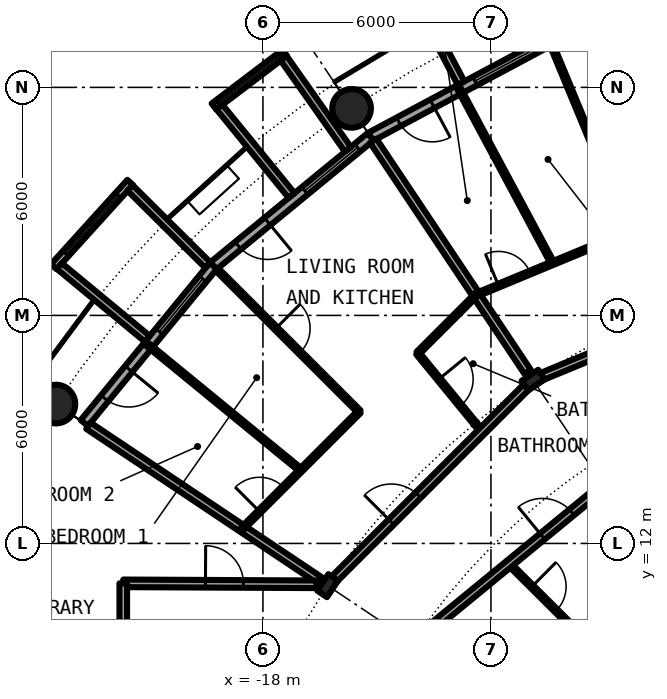
"""IFC4 building model, lengths in metres.
Left out: names, types, materials, properties, quantities, classifications, styles, units other than length and angle.
Written with IfcOpenShell. Run it as: python <this file> out.ifc"""

import sys

from ifc_helpers import new_model, si_unit, direction, frame, frame_2d, origin, origin_2d, place, context, subcontext, project, spatial, rectangle, circle, hollow_circle, i_section, extrude, element, fill, save


model = new_model("IFC4")
c1 = context("Model", 3, precision=1e-05, world=origin(), true_north=direction((0.0, 1.0)))
c2 = subcontext(c1, "Body", "Model", "MODEL_VIEW")
j1 = project(units=[si_unit("LENGTHUNIT", "METRE"), si_unit("PLANEANGLEUNIT", "RADIAN")], contexts=[c1])
p1 = place(None, origin())
s1 = spatial("IfcSite", under=j1, at=p1, CompositionType="ELEMENT")
p2 = place(p1, origin())
s2 = spatial("IfcBuilding", under=s1, at=p2, CompositionType="ELEMENT")
p3 = place(p2, frame((0.0, 0.0, 72.75)))
s3 = spatial("IfcBuildingStorey", under=s2, at=p3, CompositionType="ELEMENT", Elevation=72.75)
for number, where, z_axis, x_axis in (
    (1, (-15.667, 23.448, 0.0), (0.0, 0.0, 1.0), (1.0, 0.0, 0.0)),
    (2, (-23.448, 15.667, 0.0), (0.0, 0.0, 1.0), (1.0, 0.0, 0.0)),
):
    element("IfcColumn", number, at=place(p3, frame(where, z_axis=z_axis, x_axis=x_axis)), inside=s3, PredefinedType="COLUMN", context=c2, shape_type="SweptSolid", body=[
        extrude(hollow_circle(Radius=0.508, WallThickness=0.04, at=origin_2d()), origin(), (0.0, 0.0, 1.0), 3.05),
    ])
for number, where, z_axis, x_axis in (
    (3, (-10.889, 16.297, 0.0), (0.0, 0.0, 1.0), (-0.556, 0.831, 0.0)),
    (4, (-16.297, 10.889, 0.0), (0.0, 0.0, 1.0), (-0.831, 0.556, 0.0)),
):
    element("IfcColumn", number, at=place(p3, frame(where, z_axis=z_axis, x_axis=x_axis)), inside=s3, PredefinedType="COLUMN", context=c2, shape_type="SweptSolid", body=[
        extrude(i_section(OverallWidth=0.306, OverallDepth=0.524, WebThickness=0.021, FlangeThickness=0.04, FilletRadius=0.027, at=origin_2d()), origin(), (0.0, 0.0, 1.0), 3.05),
    ])
p4 = place(p3, frame((-10.447, 25.222, 0.0), z_axis=(0.0, 0.0, 1.0), x_axis=(-0.881915646801, -0.471407246368, 0.0)))
e5 = element("IfcWall", 5, at=p4, inside=s3, PredefinedType="SOLIDWALL", context=c2, shape_type="SweptSolid", body=[
    extrude(rectangle(XDim=5.352, YDim=0.25, at=frame_2d((2.676, 0.0))), origin(), (0.0, 0.0, 1.0), 2.7),
])
p5 = place(p4, frame((0.441, 0.0, 0.3)))
e6 = element("IfcOpeningElement", 6, at=p5, cuts=e5, PredefinedType="OPENING", context=c2, shape_type="SweptSolid", body=[
    extrude(rectangle(XDim=1.8, YDim=2.1, at=frame_2d((0.9, 1.05))), frame((0.0, 0.135, 0.0), z_axis=(0.0, -1.0, 0.0), x_axis=(1.0, 0.0, 0.0)), (0.0, 0.0, 1.0), 0.27),
])
p6 = place(p4, frame((3.51, 0.0, 0.0)))
e7 = element("IfcOpeningElement", 7, at=p6, cuts=e5, PredefinedType="OPENING", context=c2, shape_type="SweptSolid", body=[
    extrude(rectangle(XDim=1.0, YDim=2.2, at=frame_2d((0.5, 1.1))), frame((0.0, 0.135, 0.0), z_axis=(0.0, -1.0, 0.0), x_axis=(1.0, 0.0, 0.0)), (0.0, 0.0, 1.0), 0.27),
])
p7 = place(p3, frame((-12.787, 24.113, -0.03), z_axis=(0.0, 0.0, 1.0), x_axis=(-0.468365282436, 0.883534924159, 0.0)))
e8 = element("IfcWall", 8, at=p7, inside=s3, PredefinedType="SOLIDWALL", context=c2, shape_type="SweptSolid", body=[
    extrude(rectangle(XDim=3.006, YDim=0.2, at=frame_2d((1.503, 0.0))), origin(), (0.0, 0.0, 1.0), 2.73),
])
p8 = place(p3, frame((-15.167, 22.699, 0.0), z_axis=(0.0, 0.0, 1.0), x_axis=(-0.773019449054, -0.634382322723, 0.0)))
e9 = element("IfcWall", 9, at=p8, inside=s3, PredefinedType="SOLIDWALL", context=c2, shape_type="SweptSolid", body=[
    extrude(rectangle(XDim=5.352, YDim=0.25, at=frame_2d((2.676, 0.0))), origin(), (0.0, 0.0, 1.0), 2.7),
])
p9 = place(p8, frame((0.441, 0.0, 0.3)))
e10 = element("IfcOpeningElement", 10, at=p9, cuts=e9, PredefinedType="OPENING", context=c2, shape_type="SweptSolid", body=[
    extrude(rectangle(XDim=1.8, YDim=2.1, at=frame_2d((0.9, 1.05))), frame((0.0, 0.135, 0.0), z_axis=(0.0, -1.0, 0.0), x_axis=(1.0, 0.0, 0.0)), (0.0, 0.0, 1.0), 0.27),
])
p10 = place(p8, frame((3.51, 0.0, 0.0)))
e11 = element("IfcOpeningElement", 11, at=p10, cuts=e9, PredefinedType="OPENING", context=c2, shape_type="SweptSolid", body=[
    extrude(rectangle(XDim=1.0, YDim=2.2, at=frame_2d((0.5, 1.1))), frame((0.0, 0.135, 0.0), z_axis=(0.0, -1.0, 0.0), x_axis=(1.0, 0.0, 0.0)), (0.0, 0.0, 1.0), 0.27),
])
p11 = place(p3, frame((-17.427, 24.909, -0.03), z_axis=(0.0, 0.0, 1.0), x_axis=(-0.796842165306, -0.60418752353, 0.0)))
e12 = element("IfcWall", 12, at=p11, inside=s3, PredefinedType="SOLIDWALL", context=c2, shape_type="SweptSolid", body=[
    extrude(rectangle(XDim=2.337, YDim=0.2, at=frame_2d((1.168, 0.0))), origin(), (0.0, 0.0, 1.0), 2.73),
])
p12 = place(p11, frame((0.128, 0.0, 0.33)))
e13 = element("IfcOpeningElement", 13, at=p12, cuts=e12, PredefinedType="OPENING", context=c2, shape_type="SweptSolid", body=[
    extrude(circle(Radius=1.04, at=frame_2d((1.04, 1.04))), frame((0.0, 0.11, 0.0), z_axis=(0.0, -1.0, 0.0), x_axis=(1.0, 0.0, 0.0)), (0.0, 0.0, 1.0), 0.22),
])
p13 = place(p3, frame((-15.765, 22.37, -0.03), z_axis=(0.0, 0.0, 1.0), x_axis=(-0.576274612209, 0.817256123454, 0.0)))
e14 = element("IfcWall", 14, at=p13, inside=s3, PredefinedType="SOLIDWALL", context=c2, shape_type="SweptSolid", body=[
    extrude(rectangle(XDim=2.933, YDim=0.2, at=frame_2d((1.466, 0.0))), origin(), (0.0, 0.0, 1.0), 2.73),
])
p14 = place(p3, frame((-17.246, 21.155, -0.03), z_axis=(0.0, 0.0, 1.0), x_axis=(-0.631741648902, 0.775179004516, 0.0)))
e15 = element("IfcWall", 15, at=p14, inside=s3, PredefinedType="SOLIDWALL", context=c2, shape_type="SweptSolid", body=[
    extrude(rectangle(XDim=3.006, YDim=0.2, at=frame_2d((1.503, 0.0))), origin(), (0.0, 0.0, 1.0), 2.73),
])
p15 = place(p3, frame((-19.304, 19.304, 0.0), z_axis=(0.0, 0.0, 1.0), x_axis=(-0.634382322723, -0.773019449054, 0.0)))
e16 = element("IfcWall", 16, at=p15, inside=s3, PredefinedType="SOLIDWALL", context=c2, shape_type="SweptSolid", body=[
    extrude(rectangle(XDim=5.352, YDim=0.25, at=frame_2d((2.676, 0.0))), origin(), (0.0, 0.0, 1.0), 2.7),
])
p16 = place(p15, frame((0.441, 0.0, 0.3)))
e17 = element("IfcOpeningElement", 17, at=p16, cuts=e16, PredefinedType="OPENING", context=c2, shape_type="SweptSolid", body=[
    extrude(rectangle(XDim=1.8, YDim=2.1, at=frame_2d((0.9, 1.05))), frame((0.0, 0.135, 0.0), z_axis=(0.0, -1.0, 0.0), x_axis=(1.0, 0.0, 0.0)), (0.0, 0.0, 1.0), 0.27),
])
p17 = place(p15, frame((3.51, 0.0, 0.0)))
e18 = element("IfcOpeningElement", 18, at=p17, cuts=e16, PredefinedType="OPENING", context=c2, shape_type="SweptSolid", body=[
    extrude(rectangle(XDim=1.0, YDim=2.2, at=frame_2d((0.5, 1.1))), frame((0.0, 0.135, 0.0), z_axis=(0.0, -1.0, 0.0), x_axis=(1.0, 0.0, 0.0)), (0.0, 0.0, 1.0), 0.27),
])
p18 = place(p3, frame((-21.493, 21.5, -0.03), z_axis=(0.0, 0.0, 1.0), x_axis=(-0.671506829416, -0.740998365753, 0.0)))
e19 = element("IfcWall", 19, at=p18, inside=s3, PredefinedType="SOLIDWALL", context=c2, shape_type="SweptSolid", body=[
    extrude(rectangle(XDim=2.993, YDim=0.2, at=frame_2d((1.497, 0.0))), origin(), (0.0, 0.0, 1.0), 2.73),
])
p19 = place(p18, frame((0.457, 0.0, 0.33)))
e20 = element("IfcOpeningElement", 20, at=p19, cuts=e19, PredefinedType="OPENING", context=c2, shape_type="SweptSolid", body=[
    extrude(circle(Radius=1.04, at=frame_2d((1.04, 1.04))), frame((0.0, 0.11, 0.0), z_axis=(0.0, -1.0, 0.0), x_axis=(1.0, 0.0, 0.0)), (0.0, 0.0, 1.0), 0.22),
])
p20 = place(p3, frame((-19.45, 19.323, -0.03), z_axis=(0.0, 0.0, 1.0), x_axis=(-0.709727076896, 0.704476739375, 0.0)))
e21 = element("IfcWall", 21, at=p20, inside=s3, PredefinedType="SOLIDWALL", context=c2, shape_type="SweptSolid", body=[
    extrude(rectangle(XDim=2.883, YDim=0.2, at=frame_2d((1.441, 0.0))), origin(), (0.0, 0.0, 1.0), 2.73),
])
p21 = place(p3, frame((-21.041, 17.384, -0.03), z_axis=(0.0, 0.0, 1.0), x_axis=(-0.770784861449, 0.63709551667, 0.0)))
e22 = element("IfcWall", 22, at=p21, inside=s3, PredefinedType="SOLIDWALL", context=c2, shape_type="SweptSolid", body=[
    extrude(rectangle(XDim=3.006, YDim=0.2, at=frame_2d((1.503, 0.0))), origin(), (0.0, 0.0, 1.0), 2.73),
])
p22 = place(p3, frame((-22.595, 15.098, 0.0), z_axis=(0.0, 0.0, 1.0), x_axis=(0.831382022135, -0.555701298605, 0.0)))
e23 = element("IfcWall", 23, at=p22, inside=s3, PredefinedType="PARTITIONING", context=c2, shape_type="SweptSolid", body=[
    extrude(rectangle(XDim=7.313, YDim=0.2, at=frame_2d((3.657, 0.0))), origin(), (0.0, 0.0, 1.0), 2.7),
])
p23 = place(p3, frame((-21.023, 17.22, 0.0), z_axis=(0.0, 0.0, 1.0), x_axis=(0.773517471898, -0.633774976367, 0.0)))
e24 = element("IfcWall", 24, at=p23, inside=s3, PredefinedType="PARTITIONING", context=c2, shape_type="SweptSolid", body=[
    extrude(rectangle(XDim=5.196, YDim=0.1, at=frame_2d((2.598, 0.0))), origin(), (0.0, 0.0, 1.0), 2.7),
])
p24 = place(p3, frame((-19.216, 19.216, 0.0), z_axis=(0.0, 0.0, 1.0), x_axis=(0.707106781187, -0.707106781187, 0.0)))
e25 = element("IfcWall", 25, at=p24, inside=s3, PredefinedType="PARTITIONING", context=c2, shape_type="SweptSolid", body=[
    extrude(rectangle(XDim=5.305, YDim=0.1, at=frame_2d((2.652, 0.0))), origin(), (0.0, 0.0, 1.0), 2.7),
])
p25 = place(p24, frame((2.202, 0.0, 0.0)))
e26 = element("IfcOpeningElement", 26, at=p25, cuts=e25, PredefinedType="OPENING", context=c2, shape_type="SweptSolid", body=[
    extrude(rectangle(XDim=0.9, YDim=2.3, at=frame_2d((0.45, 1.15))), frame((0.0, 0.06, 0.0), z_axis=(0.0, -1.0, 0.0), x_axis=(1.0, 0.0, 0.0)), (0.0, 0.0, 1.0), 0.12),
])
p26 = place(p3, frame((-15.097, 22.595, 0.0), z_axis=(0.0, 0.0, 1.0), x_axis=(0.555516661303, -0.831505405283, 0.0)))
e27 = element("IfcWall", 27, at=p26, inside=s3, PredefinedType="PARTITIONING", context=c2, shape_type="SweptSolid", body=[
    extrude(rectangle(XDim=7.312, YDim=0.2, at=frame_2d((3.656, 0.0))), origin(), (0.0, 0.0, 1.0), 2.7),
])
p27 = place(p3, frame((-13.927, 17.004, 0.0), z_axis=(0.0, 0.0, 1.0), x_axis=(0.633582447834, -0.77367517848, 0.0)))
e28 = element("IfcWall", 28, at=p27, inside=s3, PredefinedType="PARTITIONING", context=c2, shape_type="SweptSolid", body=[
    extrude(rectangle(XDim=2.661, YDim=0.1, at=frame_2d((1.331, 0.0))), origin(), (0.0, 0.0, 1.0), 2.7),
])
p28 = place(p27, frame((0.881, 0.0, 0.0)))
e29 = element("IfcOpeningElement", 29, at=p28, cuts=e28, PredefinedType="OPENING", context=c2, shape_type="SweptSolid", body=[
    extrude(rectangle(XDim=0.9, YDim=2.3, at=frame_2d((0.45, 1.15))), frame((0.0, 0.06, 0.0), z_axis=(0.0, -1.0, 0.0), x_axis=(1.0, 0.0, 0.0)), (0.0, 0.0, 1.0), 0.12),
])
p29 = place(p3, frame((-12.833, 23.954, 0.0), z_axis=(0.0, 0.0, 1.0), x_axis=(0.472148388886, -0.881519085938, 0.0)))
e30 = element("IfcWall", 30, at=p29, inside=s3, PredefinedType="PARTITIONING", context=c2, shape_type="SweptSolid", body=[
    extrude(rectangle(XDim=5.196, YDim=0.1, at=frame_2d((2.598, 0.0))), origin(), (0.0, 0.0, 1.0), 2.7),
])
p30 = place(p3, frame((-11.524, 11.464, 0.0), z_axis=(0.0, 0.0, 1.0), x_axis=(0.708796844581, -0.705412668665, 0.0)))
e31 = element("IfcWall", 31, at=p30, inside=s3, PredefinedType="PARTITIONING", context=c2, shape_type="SweptSolid", body=[
    extrude(rectangle(XDim=2.597, YDim=0.1, at=frame_2d((1.299, 0.0))), origin(), (0.0, 0.0, 1.0), 2.7),
])
p31 = place(p30, frame((0.849, 0.0, 0.0)))
e32 = element("IfcOpeningElement", 32, at=p31, cuts=e31, PredefinedType="OPENING", context=c2, shape_type="SweptSolid", body=[
    extrude(rectangle(XDim=0.9, YDim=2.3, at=frame_2d((0.45, 1.15))), frame((0.0, 0.06, 0.0), z_axis=(0.0, -1.0, 0.0), x_axis=(1.0, 0.0, 0.0)), (0.0, 0.0, 1.0), 0.12),
])
p32 = place(p3, frame((-10.399, 25.106, 0.0), z_axis=(0.0, 0.0, 1.0), x_axis=(0.382620183578, -0.92390572848, 0.0)))
e33 = element("IfcWall", 33, at=p32, inside=s3, PredefinedType="PARTITIONING", context=c2, shape_type="SweptSolid", body=[
    extrude(rectangle(XDim=5.302, YDim=0.1, at=frame_2d((2.651, 0.0))), origin(), (0.0, 0.0, 1.0), 2.7),
])
p33 = place(p32, frame((2.201, 0.0, 0.0)))
e34 = element("IfcOpeningElement", 34, at=p33, cuts=e33, PredefinedType="OPENING", context=c2, shape_type="SweptSolid", body=[
    extrude(rectangle(XDim=0.9, YDim=2.3, at=frame_2d((0.45, 1.15))), frame((0.0, 0.06, 0.0), z_axis=(0.0, -1.0, 0.0), x_axis=(1.0, 0.0, 0.0)), (0.0, 0.0, 1.0), 0.12),
])
p34 = place(p3, frame((-21.675, 10.95, 0.0), z_axis=(0.0, 0.0, 1.0), x_axis=(0.999988019025, -0.004895079807, 0.0)))
e35 = element("IfcWall", 35, at=p34, inside=s3, PredefinedType="PARTITIONING", context=c2, shape_type="SweptSolid", body=[
    extrude(rectangle(XDim=5.087, YDim=0.2, at=frame_2d((2.543, 0.0))), origin(), (0.0, 0.0, 1.0), 2.7),
])
p35 = place(p34, frame((2.163, 0.0, 0.0)))
e36 = element("IfcOpeningElement", 36, at=p35, cuts=e35, PredefinedType="OPENING", context=c2, shape_type="SweptSolid", body=[
    extrude(rectangle(XDim=1.0, YDim=2.3, at=frame_2d((0.5, 1.15))), frame((0.0, 0.11, 0.0), z_axis=(0.0, -1.0, 0.0), x_axis=(1.0, 0.0, 0.0)), (0.0, 0.0, 1.0), 0.22),
])
p36 = place(p3, frame((-10.087, 9.3, 0.0), z_axis=(0.0, 0.0, 1.0), x_axis=(0.772957368531, 0.6344579627, 0.0)))
e37 = element("IfcWall", 37, at=p36, inside=s3, PredefinedType="PARTITIONING", context=c2, shape_type="SweptSolid", body=[
    extrude(rectangle(XDim=1.906, YDim=0.1, at=frame_2d((0.953, 0.0))), origin(), (0.0, 0.0, 1.0), 2.7),
])
p37 = place(p3, frame((-14.052, 9.389, 0.0), z_axis=(0.0, 0.0, 1.0), x_axis=(0.77292501819, 0.634497372931, 0.0)))
e38 = element("IfcWall", 38, at=p37, inside=s3, PredefinedType="PARTITIONING", context=c2, shape_type="SweptSolid", body=[
    extrude(rectangle(XDim=9.81, YDim=0.2, at=frame_2d((4.905, 0.0))), origin(), (0.0, 0.0, 1.0), 2.7),
])
p38 = place(p37, frame((4.406, 0.0, 0.0)))
e39 = element("IfcOpeningElement", 39, at=p38, cuts=e38, PredefinedType="OPENING", context=c2, shape_type="SweptSolid", body=[
    extrude(rectangle(XDim=1.0, YDim=2.3, at=frame_2d((0.5, 1.15))), frame((0.0, 0.11, 0.0), z_axis=(0.0, -1.0, 0.0), x_axis=(1.0, 0.0, 0.0)), (0.0, 0.0, 1.0), 0.22),
])
p39 = place(p3, frame((-16.186, 11.0, 0.0), z_axis=(0.0, 0.0, 1.0), x_axis=(0.707106781187, 0.707106781187, 0.0)))
e40 = element("IfcWall", 40, at=p39, inside=s3, PredefinedType="PARTITIONING", context=c2, shape_type="SweptSolid", body=[
    extrude(rectangle(XDim=7.334, YDim=0.2, at=frame_2d((3.667, 0.0))), origin(), (0.0, 0.0, 1.0), 2.38),
])
p40 = place(p39, frame((2.211, 0.0, 0.0)))
e41 = element("IfcOpeningElement", 41, at=p40, cuts=e40, PredefinedType="OPENING", context=c2, shape_type="SweptSolid", body=[
    extrude(rectangle(XDim=1.0, YDim=2.3, at=frame_2d((0.5, 1.15))), frame((0.0, 0.11, 0.0), z_axis=(0.0, -1.0, 0.0), x_axis=(1.0, 0.0, 0.0)), (0.0, 0.0, 1.0), 0.22),
])
p41 = place(p3, frame((-10.745, 16.357, 0.0), z_axis=(0.0, 0.0, 1.0), x_axis=(0.923928411035, 0.382565407848, 0.0)))
e42 = element("IfcWall", 42, at=p41, inside=s3, PredefinedType="PARTITIONING", context=c2, shape_type="SweptSolid", body=[
    extrude(rectangle(XDim=7.335, YDim=0.2, at=frame_2d((3.667, 0.0))), origin(), (0.0, 0.0, 1.0), 2.38),
])
p42 = place(p41, frame((2.212, 0.0, 0.0)))
e43 = element("IfcOpeningElement", 43, at=p42, cuts=e42, PredefinedType="OPENING", context=c2, shape_type="SweptSolid", body=[
    extrude(rectangle(XDim=1.0, YDim=2.3, at=frame_2d((0.5, 1.15))), frame((0.0, 0.11, 0.0), z_axis=(0.0, -1.0, 0.0), x_axis=(1.0, 0.0, 0.0)), (0.0, 0.0, 1.0), 0.22),
])
p43 = place(p3, frame((-21.675, 9.3, 0.0), z_axis=(0.0, 0.0, 1.0), x_axis=(0.0, 1.0, 0.0)))
e44 = element("IfcWall", 44, at=p43, inside=s3, PredefinedType="PARTITIONING", context=c2, shape_type="SweptSolid", body=[
    extrude(rectangle(XDim=1.65, YDim=0.2, at=frame_2d((0.825, 0.0))), origin(), (0.0, 0.0, 1.0), 2.7),
])
p44 = place(p3, frame((-18.542, 12.389, 0.0), z_axis=(0.0, 0.0, 1.0), x_axis=(0.707190945535, 0.707022606819, 0.0)))
e45 = element("IfcWall", 45, at=p44, inside=s3, PredefinedType="PARTITIONING", context=c2, shape_type="SweptSolid", body=[
    extrude(rectangle(XDim=4.351, YDim=0.1, at=frame_2d((2.175, 0.0))), origin(), (0.0, 0.0, 1.0), 2.7),
])
p45 = place(p44, frame((0.639, 0.0, 0.0)))
e46 = element("IfcOpeningElement", 46, at=p45, cuts=e45, PredefinedType="OPENING", context=c2, shape_type="SweptSolid", body=[
    extrude(rectangle(XDim=0.9, YDim=2.3, at=frame_2d((0.45, 1.15))), frame((0.0, 0.06, 0.0), z_axis=(0.0, -1.0, 0.0), x_axis=(1.0, 0.0, 0.0)), (0.0, 0.0, 1.0), 0.12),
])
p46 = place(p3, frame((-13.924, 17.006, 0.0), z_axis=(0.0, 0.0, 1.0), x_axis=(0.707387256653, 0.706826194425, 0.0)))
e47 = element("IfcWall", 47, at=p46, inside=s3, PredefinedType="PARTITIONING", context=c2, shape_type="SweptSolid", body=[
    extrude(rectangle(XDim=2.176, YDim=0.1, at=frame_2d((1.088, 0.0))), origin(), (0.0, 0.0, 1.0), 2.7),
])
p47 = place(p3, frame((-12.397, 18.536, 0.0), z_axis=(0.0, 0.0, 1.0), x_axis=(0.923761942059, 0.382967197554, 0.0)))
e48 = element("IfcWall", 48, at=p47, inside=s3, PredefinedType="PARTITIONING", context=c2, shape_type="SweptSolid", body=[
    extrude(rectangle(XDim=4.356, YDim=0.1, at=frame_2d((2.178, 0.0))), origin(), (0.0, 0.0, 1.0), 2.7),
])
p48 = place(p47, frame((0.646, 0.0, 0.0)))
e49 = element("IfcOpeningElement", 49, at=p48, cuts=e48, PredefinedType="OPENING", context=c2, shape_type="SweptSolid", body=[
    extrude(rectangle(XDim=0.9, YDim=2.3, at=frame_2d((0.45, 1.15))), frame((0.0, 0.06, 0.0), z_axis=(0.0, -1.0, 0.0), x_axis=(1.0, 0.0, 0.0)), (0.0, 0.0, 1.0), 0.12),
])
p49 = place(p5, origin())
e50 = element("IfcWindow", 50, at=p49, inside=s3, PartitioningType="SINGLE_PANEL", PredefinedType="WINDOW", context=c2, shape_type="SweptSolid", body=[
    extrude(rectangle(XDim=1.8, YDim=2.1, at=frame_2d((0.9, 1.05))), frame((0.0, 0.03, 0.0), z_axis=(0.0, -1.0, 0.0), x_axis=(1.0, 0.0, 0.0)), (0.0, 0.0, 1.0), 0.06),
])
fill(e6, e50)
p50 = place(p6, origin())
e51 = element("IfcDoor", 51, at=p50, inside=s3, OperationType="SINGLE_SWING_LEFT", PredefinedType="DOOR", context=c2, shape_type="SweptSolid", body=[
    extrude(rectangle(XDim=1.0, YDim=2.2, at=frame_2d((0.5, 1.1))), frame((0.0, 0.025, 0.0), z_axis=(0.0, -1.0, 0.0), x_axis=(1.0, 0.0, 0.0)), (0.0, 0.0, 1.0), 0.05),
])
fill(e7, e51)
p51 = place(p9, origin())
e52 = element("IfcWindow", 52, at=p51, inside=s3, PartitioningType="SINGLE_PANEL", PredefinedType="WINDOW", context=c2, shape_type="SweptSolid", body=[
    extrude(rectangle(XDim=1.8, YDim=2.1, at=frame_2d((0.9, 1.05))), frame((0.0, 0.03, 0.0), z_axis=(0.0, -1.0, 0.0), x_axis=(1.0, 0.0, 0.0)), (0.0, 0.0, 1.0), 0.06),
])
fill(e10, e52)
p52 = place(p12, origin())
e53 = element("IfcWindow", 53, at=p52, inside=s3, PartitioningType="SINGLE_PANEL", PredefinedType="WINDOW", context=c2, shape_type="SweptSolid", body=[
    extrude(circle(Radius=1.04, at=frame_2d((1.04, 1.04))), frame((0.0, 0.03, 0.0), z_axis=(0.0, -1.0, 0.0), x_axis=(1.0, 0.0, 0.0)), (0.0, 0.0, 1.0), 0.06),
])
fill(e13, e53)
p53 = place(p10, origin())
e54 = element("IfcDoor", 54, at=p53, inside=s3, OperationType="SINGLE_SWING_LEFT", PredefinedType="DOOR", context=c2, shape_type="SweptSolid", body=[
    extrude(rectangle(XDim=1.0, YDim=2.2, at=frame_2d((0.5, 1.1))), frame((0.0, 0.025, 0.0), z_axis=(0.0, -1.0, 0.0), x_axis=(1.0, 0.0, 0.0)), (0.0, 0.0, 1.0), 0.05),
])
fill(e11, e54)
p54 = place(p16, origin())
e55 = element("IfcWindow", 55, at=p54, inside=s3, PartitioningType="SINGLE_PANEL", PredefinedType="WINDOW", context=c2, shape_type="SweptSolid", body=[
    extrude(rectangle(XDim=1.8, YDim=2.1, at=frame_2d((0.9, 1.05))), frame((0.0, 0.03, 0.0), z_axis=(0.0, -1.0, 0.0), x_axis=(1.0, 0.0, 0.0)), (0.0, 0.0, 1.0), 0.06),
])
fill(e17, e55)
p55 = place(p19, origin())
e56 = element("IfcWindow", 56, at=p55, inside=s3, PartitioningType="SINGLE_PANEL", PredefinedType="WINDOW", context=c2, shape_type="SweptSolid", body=[
    extrude(circle(Radius=1.04, at=frame_2d((1.04, 1.04))), frame((0.0, 0.03, 0.0), z_axis=(0.0, -1.0, 0.0), x_axis=(1.0, 0.0, 0.0)), (0.0, 0.0, 1.0), 0.06),
])
fill(e20, e56)
p56 = place(p17, origin())
e57 = element("IfcDoor", 57, at=p56, inside=s3, OperationType="SINGLE_SWING_LEFT", PredefinedType="DOOR", context=c2, shape_type="SweptSolid", body=[
    extrude(rectangle(XDim=1.0, YDim=2.2, at=frame_2d((0.5, 1.1))), frame((0.0, 0.025, 0.0), z_axis=(0.0, -1.0, 0.0), x_axis=(1.0, 0.0, 0.0)), (0.0, 0.0, 1.0), 0.05),
])
fill(e18, e57)
p57 = place(p33, origin())
e58 = element("IfcDoor", 58, at=p57, inside=s3, OperationType="SINGLE_SWING_LEFT", PredefinedType="DOOR", context=c2, shape_type="SweptSolid", body=[
    extrude(rectangle(XDim=0.9, YDim=2.3, at=frame_2d((0.45, 1.15))), frame((0.0, 0.025, 0.0), z_axis=(0.0, -1.0, 0.0), x_axis=(1.0, 0.0, 0.0)), (0.0, 0.0, 1.0), 0.05),
])
fill(e34, e58)
p58 = place(p48, origin())
e59 = element("IfcDoor", 59, at=p58, inside=s3, OperationType="SINGLE_SWING_LEFT", PredefinedType="DOOR", context=c2, shape_type="SweptSolid", body=[
    extrude(rectangle(XDim=0.9, YDim=2.3, at=frame_2d((0.45, 1.15))), frame((0.0, 0.025, 0.0), z_axis=(0.0, -1.0, 0.0), x_axis=(1.0, 0.0, 0.0)), (0.0, 0.0, 1.0), 0.05),
])
fill(e49, e59)
p59 = place(p40, origin())
e60 = element("IfcDoor", 60, at=p59, inside=s3, OperationType="SINGLE_SWING_LEFT", PredefinedType="DOOR", context=c2, shape_type="SweptSolid", body=[
    extrude(rectangle(XDim=1.0, YDim=2.3, at=frame_2d((0.5, 1.15))), frame((0.0, 0.025, 0.0), z_axis=(0.0, -1.0, 0.0), x_axis=(1.0, 0.0, 0.0)), (0.0, 0.0, 1.0), 0.05),
])
fill(e41, e60)
p60 = place(p28, origin())
e61 = element("IfcDoor", 61, at=p60, inside=s3, OperationType="SINGLE_SWING_RIGHT", PredefinedType="DOOR", context=c2, shape_type="SweptSolid", body=[
    extrude(rectangle(XDim=0.9, YDim=2.3, at=frame_2d((0.45, 1.15))), frame((0.0, 0.025, 0.0), z_axis=(0.0, -1.0, 0.0), x_axis=(1.0, 0.0, 0.0)), (0.0, 0.0, 1.0), 0.05),
])
fill(e29, e61)
p61 = place(p25, origin())
e62 = element("IfcDoor", 62, at=p61, inside=s3, OperationType="SINGLE_SWING_LEFT", PredefinedType="DOOR", context=c2, shape_type="SweptSolid", body=[
    extrude(rectangle(XDim=0.9, YDim=2.3, at=frame_2d((0.45, 1.15))), frame((0.0, 0.025, 0.0), z_axis=(0.0, -1.0, 0.0), x_axis=(1.0, 0.0, 0.0)), (0.0, 0.0, 1.0), 0.05),
])
fill(e26, e62)
p62 = place(p45, origin())
e63 = element("IfcDoor", 63, at=p62, inside=s3, OperationType="SINGLE_SWING_LEFT", PredefinedType="DOOR", context=c2, shape_type="SweptSolid", body=[
    extrude(rectangle(XDim=0.9, YDim=2.3, at=frame_2d((0.45, 1.15))), frame((0.0, 0.025, 0.0), z_axis=(0.0, -1.0, 0.0), x_axis=(1.0, 0.0, 0.0)), (0.0, 0.0, 1.0), 0.05),
])
fill(e46, e63)
p63 = place(p38, origin())
e64 = element("IfcDoor", 64, at=p63, inside=s3, OperationType="SINGLE_SWING_RIGHT", PredefinedType="DOOR", context=c2, shape_type="SweptSolid", body=[
    extrude(rectangle(XDim=1.0, YDim=2.3, at=frame_2d((0.5, 1.15))), frame((0.0, 0.025, 0.0), z_axis=(0.0, -1.0, 0.0), x_axis=(1.0, 0.0, 0.0)), (0.0, 0.0, 1.0), 0.05),
])
fill(e39, e64)
p64 = place(p31, origin())
e65 = element("IfcDoor", 65, at=p64, inside=s3, OperationType="SINGLE_SWING_RIGHT", PredefinedType="DOOR", context=c2, shape_type="SweptSolid", body=[
    extrude(rectangle(XDim=0.9, YDim=2.3, at=frame_2d((0.45, 1.15))), frame((0.0, 0.025, 0.0), z_axis=(0.0, -1.0, 0.0), x_axis=(1.0, 0.0, 0.0)), (0.0, 0.0, 1.0), 0.05),
])
fill(e32, e65)
p65 = place(p35, origin())
e66 = element("IfcDoor", 66, at=p65, inside=s3, OperationType="SINGLE_SWING_RIGHT", PredefinedType="DOOR", context=c2, shape_type="SweptSolid", body=[
    extrude(rectangle(XDim=1.0, YDim=2.3, at=frame_2d((0.5, 1.15))), frame((0.0, 0.025, 0.0), z_axis=(0.0, -1.0, 0.0), x_axis=(1.0, 0.0, 0.0)), (0.0, 0.0, 1.0), 0.05),
])
fill(e36, e66)
save(model, sys.argv[1])
